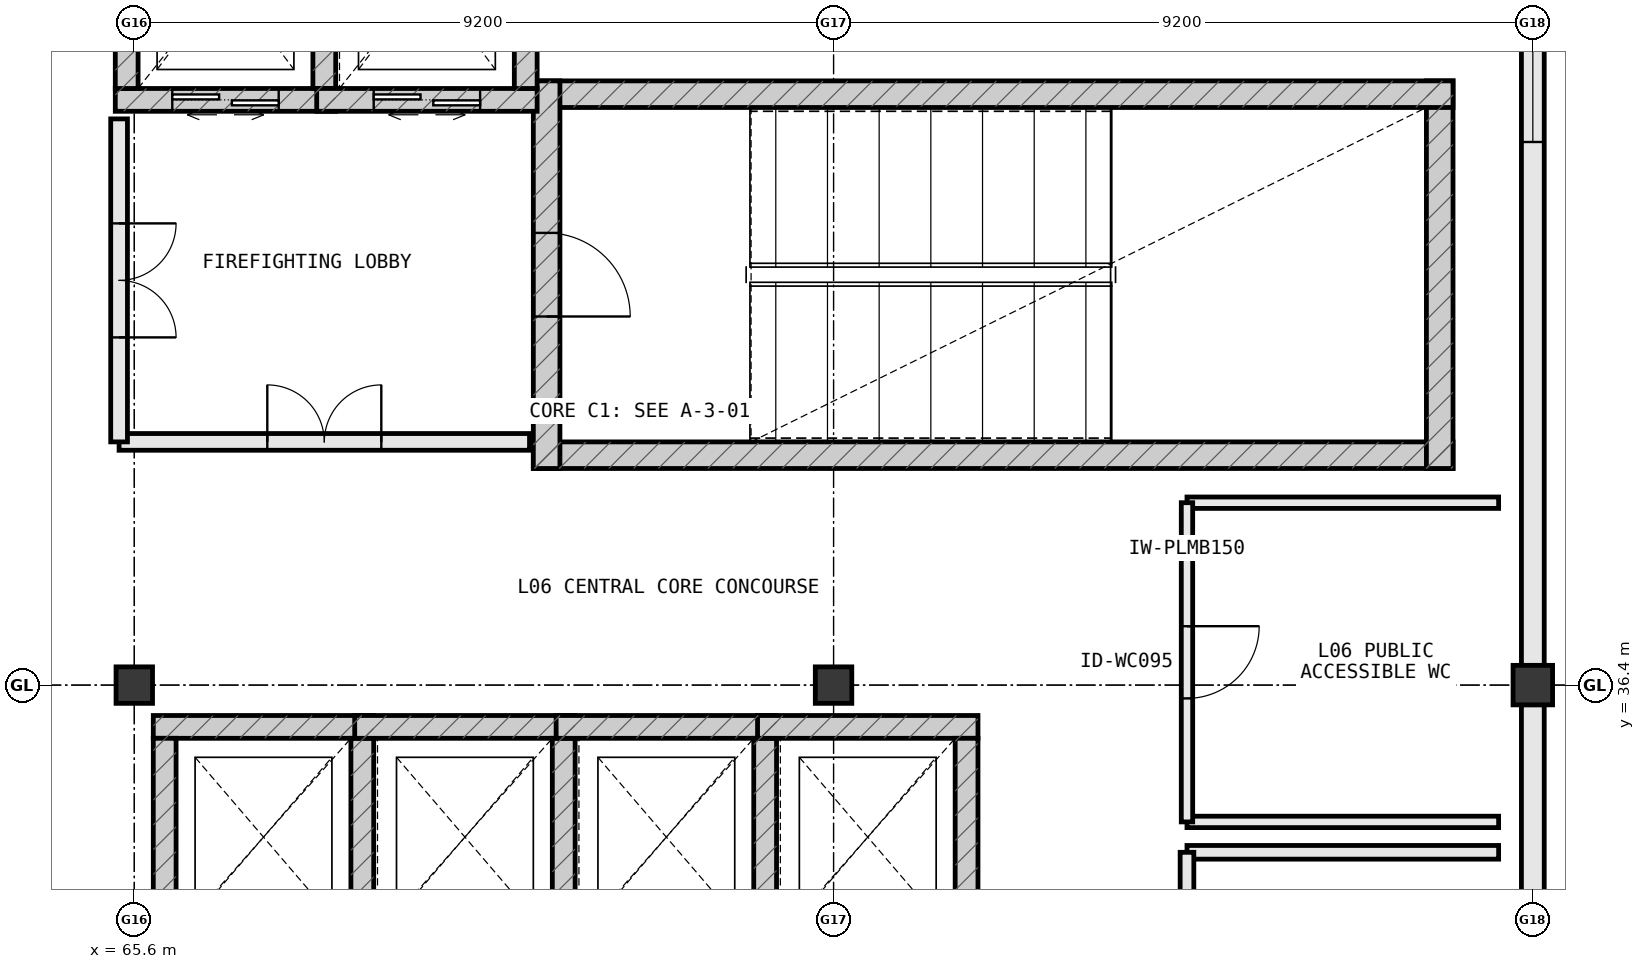
"""IFC4 building model, lengths in metres.
Left out: names, types, materials, properties, quantities, classifications, styles, units other than length and angle.
Written with IfcOpenShell. Run it as: python <this file> out.ifc"""

import sys

from ifc_helpers import new_model, si_unit, direction, frame, frame_2d, origin, origin_2d, place, context, subcontext, project, spatial, rectangle, extrude, element, fill, save


model = new_model("IFC4")
c1 = context("Model", 3, precision=1e-05, world=origin(), true_north=direction((0.0, 1.0)))
c2 = subcontext(c1, "Body", "Model", "MODEL_VIEW")
j1 = project(units=[si_unit("LENGTHUNIT", "METRE"), si_unit("PLANEANGLEUNIT", "RADIAN")], contexts=[c1])
p1 = place(None, origin())
s1 = spatial("IfcSite", under=j1, at=p1, CompositionType="ELEMENT")
p2 = place(p1, origin())
s2 = spatial("IfcBuilding", under=s1, at=p2, CompositionType="ELEMENT")
p3 = place(p2, frame((0.0, 0.0, 27.6)))
s3 = spatial("IfcBuildingStorey", under=s2, at=p3, CompositionType="ELEMENT", Elevation=27.6)
p4 = place(p3, frame((74.8, 36.4, 0.0), z_axis=(0.0, 0.0, 1.0), x_axis=(1.0, 0.0, 0.0)))
e1 = element("IfcColumn", 1, at=p4, inside=s3, PredefinedType="COLUMN", context=c2, shape_type="SweptSolid", body=[
    extrude(rectangle(XDim=0.48, YDim=0.48, at=origin_2d()), origin(), (0.0, 0.0, 1.0), 3.8),
])
p5 = place(p3, frame((84.0, 36.4, 0.0), z_axis=(0.0, 0.0, 1.0), x_axis=(1.0, 0.0, 0.0)))
e2 = element("IfcColumn", 2, at=p5, inside=s3, PredefinedType="COLUMN", context=c2, shape_type="SweptSolid", body=[
    extrude(rectangle(XDim=0.52, YDim=0.52, at=origin_2d()), origin(), (0.0, 0.0, 1.0), 3.8),
])
p6 = place(p3, frame((65.6, 36.4, 0.0), z_axis=(0.0, 0.0, 1.0), x_axis=(1.0, 0.0, 0.0)))
e3 = element("IfcColumn", 3, at=p6, inside=s3, PredefinedType="COLUMN", context=c2, shape_type="SweptSolid", body=[
    extrude(rectangle(XDim=0.48, YDim=0.48, at=origin_2d()), origin(), (0.0, 0.0, 1.0), 3.8),
])
p7 = place(p3, frame((84.0, 27.258, 0.0), z_axis=(0.0, 0.0, 1.0), x_axis=(0.0, 1.0, 0.0)))
e4 = element("IfcWall", 4, at=p7, inside=s3, PredefinedType="STANDARD", context=c2, shape_type="SweptSolid", body=[
    extrude(rectangle(XDim=8.884, YDim=0.3, at=frame_2d((4.442, 0.0))), origin(), (0.0, 0.0, 1.0), 2.97),
])
p8 = place(p7, frame((3.617, 0.0, 0.85)))
e5 = element("IfcOpeningElement", 5, at=p8, cuts=e4, PredefinedType="OPENING", context=c2, shape_type="SweptSolid", body=[
    extrude(rectangle(XDim=1.65, YDim=1.8, at=frame_2d((0.825, 0.9))), frame((0.0, 0.162, 0.0), z_axis=(0.0, -1.0, 0.0), x_axis=(1.0, 0.0, 0.0)), (0.0, 0.0, 1.0), 0.324),
])
p9 = place(p3, frame((84.0, 36.658, 0.0), z_axis=(0.0, 0.0, 1.0), x_axis=(0.0, 1.0, 0.0)))
e6 = element("IfcWall", 6, at=p9, inside=s3, PredefinedType="STANDARD", context=c2, shape_type="SweptSolid", body=[
    extrude(rectangle(XDim=10.284, YDim=0.3, at=frame_2d((5.142, 0.0))), origin(), (0.0, 0.0, 1.0), 2.97),
])
p10 = place(p9, frame((6.888, 0.0, 0.85)))
e7 = element("IfcOpeningElement", 7, at=p10, cuts=e6, PredefinedType="OPENING", context=c2, shape_type="SweptSolid", body=[
    extrude(rectangle(XDim=1.65, YDim=1.8, at=frame_2d((0.825, 0.9))), frame((0.0, 0.162, 0.0), z_axis=(0.0, -1.0, 0.0), x_axis=(1.0, 0.0, 0.0)), (0.0, 0.0, 1.0), 0.324),
])
p11 = place(p3, frame((70.85, 39.425, 0.0), z_axis=(0.0, 0.0, 1.0), x_axis=(1.0, 0.0, 0.0)))
e8 = element("IfcWall", 8, at=p11, inside=s3, PredefinedType="SHEAR", context=c2, shape_type="SweptSolid", body=[
    extrude(rectangle(XDim=12.1, YDim=0.35, at=frame_2d((6.05, 0.0))), origin(), (0.0, 0.0, 1.0), 3.8),
])
p12 = place(p3, frame((82.775, 39.25, 0.0), z_axis=(0.0, 0.0, 1.0), x_axis=(0.0, 1.0, 0.0)))
e9 = element("IfcWall", 9, at=p12, inside=s3, PredefinedType="SHEAR", context=c2, shape_type="SweptSolid", body=[
    extrude(rectangle(XDim=5.1, YDim=0.35, at=frame_2d((2.55, 0.0))), origin(), (0.0, 0.0, 1.0), 3.8),
])
p13 = place(p3, frame((82.95, 44.175, 0.0), z_axis=(0.0, 0.0, 1.0), x_axis=(-1.0, 0.0, 0.0)))
e10 = element("IfcWall", 10, at=p13, inside=s3, PredefinedType="SHEAR", context=c2, shape_type="SweptSolid", body=[
    extrude(rectangle(XDim=12.1, YDim=0.35, at=frame_2d((6.05, 0.0))), origin(), (0.0, 0.0, 1.0), 3.8),
])
p14 = place(p3, frame((71.025, 44.35, 0.0), z_axis=(0.0, 0.0, 1.0), x_axis=(0.0, -1.0, 0.0)))
e11 = element("IfcWall", 11, at=p14, inside=s3, PredefinedType="SHEAR", context=c2, shape_type="SweptSolid", body=[
    extrude(rectangle(XDim=5.1, YDim=0.35, at=frame_2d((2.55, 0.0))), origin(), (0.0, 0.0, 1.0), 3.8),
])
p15 = place(p14, frame((2.0, 0.0, 0.0)))
e12 = element("IfcOpeningElement", 12, at=p15, cuts=e11, PredefinedType="OPENING", context=c2, shape_type="SweptSolid", body=[
    extrude(rectangle(XDim=1.1, YDim=2.2, at=frame_2d((0.55, 1.1))), frame((0.0, 0.187, 0.0), z_axis=(0.0, -1.0, 0.0), x_axis=(1.0, 0.0, 0.0)), (0.0, 0.0, 1.0), 0.374),
])
p16 = place(p3, frame((65.35, 44.1, 0.0), z_axis=(0.0, 0.0, 1.0), x_axis=(1.0, 0.0, 0.0)))
e13 = element("IfcWall", 13, at=p16, inside=s3, PredefinedType="SHEAR", context=c2, shape_type="SweptSolid", body=[
    extrude(rectangle(XDim=2.9, YDim=0.3, at=frame_2d((1.45, 0.0))), origin(), (0.0, 0.0, 1.0), 3.8),
])
p17 = place(p16, frame((0.75, 0.0, 0.0)))
e14 = element("IfcOpeningElement", 14, at=p17, cuts=e13, PredefinedType="OPENING", context=c2, shape_type="SweptSolid", body=[
    extrude(rectangle(XDim=1.4, YDim=2.2, at=frame_2d((0.7, 1.1))), frame((0.0, 0.162, 0.0), z_axis=(0.0, -1.0, 0.0), x_axis=(1.0, 0.0, 0.0)), (0.0, 0.0, 1.0), 0.324),
])
for number, where, z_axis, x_axis in (
    (15, (68.1, 44.25, 0.0), (0.0, 0.0, 1.0), (0.0, 1.0, 0.0)),
    (16, (65.5, 47.15, 0.0), (0.0, 0.0, 1.0), (0.0, -1.0, 0.0)),
):
    element("IfcWall", number, at=place(p3, frame(where, z_axis=z_axis, x_axis=x_axis)), inside=s3, PredefinedType="SHEAR", context=c2, shape_type="SweptSolid", body=[
        extrude(rectangle(XDim=2.9, YDim=0.3, at=frame_2d((1.45, 0.0))), origin(), (0.0, 0.0, 1.0), 3.8),
    ])
p18 = place(p3, frame((68.0, 44.1, 0.0), z_axis=(0.0, 0.0, 1.0), x_axis=(1.0, 0.0, 0.0)))
e17 = element("IfcWall", 17, at=p18, inside=s3, PredefinedType="SHEAR", context=c2, shape_type="SweptSolid", body=[
    extrude(rectangle(XDim=2.9, YDim=0.3, at=frame_2d((1.45, 0.0))), origin(), (0.0, 0.0, 1.0), 3.8),
])
p19 = place(p18, frame((0.75, 0.0, 0.0)))
e18 = element("IfcOpeningElement", 18, at=p19, cuts=e17, PredefinedType="OPENING", context=c2, shape_type="SweptSolid", body=[
    extrude(rectangle(XDim=1.4, YDim=2.2, at=frame_2d((0.7, 1.1))), frame((0.0, 0.162, 0.0), z_axis=(0.0, -1.0, 0.0), x_axis=(1.0, 0.0, 0.0)), (0.0, 0.0, 1.0), 0.324),
])
for number, where, z_axis, x_axis in (
    (19, (70.75, 44.25, 0.0), (0.0, 0.0, 1.0), (0.0, 1.0, 0.0)),
    (20, (68.75, 35.85, 0.0), (0.0, 0.0, 1.0), (-1.0, 0.0, 0.0)),
):
    element("IfcWall", number, at=place(p3, frame(where, z_axis=z_axis, x_axis=x_axis)), inside=s3, PredefinedType="SHEAR", context=c2, shape_type="SweptSolid", body=[
        extrude(rectangle(XDim=2.9, YDim=0.3, at=frame_2d((1.45, 0.0))), origin(), (0.0, 0.0, 1.0), 3.8),
    ])
for number, where, z_axis, x_axis in (
    (21, (68.6, 33.1, 0.0), (0.0, 0.0, 1.0), (0.0, 1.0, 0.0)),
    (22, (66.0, 35.7, 0.0), (0.0, 0.0, 1.0), (0.0, -1.0, 0.0)),
):
    element("IfcWall", number, at=place(p3, frame(where, z_axis=z_axis, x_axis=x_axis)), inside=s3, PredefinedType="SHEAR", context=c2, shape_type="SweptSolid", body=[
        extrude(rectangle(XDim=2.6, YDim=0.3, at=frame_2d((1.3, 0.0))), origin(), (0.0, 0.0, 1.0), 3.8),
    ])
p20 = place(p3, frame((71.4, 35.85, 0.0), z_axis=(0.0, 0.0, 1.0), x_axis=(-1.0, 0.0, 0.0)))
e23 = element("IfcWall", 23, at=p20, inside=s3, PredefinedType="SHEAR", context=c2, shape_type="SweptSolid", body=[
    extrude(rectangle(XDim=2.9, YDim=0.3, at=frame_2d((1.45, 0.0))), origin(), (0.0, 0.0, 1.0), 3.8),
])
p21 = place(p3, frame((71.25, 33.1, 0.0), z_axis=(0.0, 0.0, 1.0), x_axis=(0.0, 1.0, 0.0)))
e24 = element("IfcWall", 24, at=p21, inside=s3, PredefinedType="SHEAR", context=c2, shape_type="SweptSolid", body=[
    extrude(rectangle(XDim=2.6, YDim=0.3, at=frame_2d((1.3, 0.0))), origin(), (0.0, 0.0, 1.0), 3.8),
])
p22 = place(p3, frame((74.05, 35.85, 0.0), z_axis=(0.0, 0.0, 1.0), x_axis=(-1.0, 0.0, 0.0)))
e25 = element("IfcWall", 25, at=p22, inside=s3, PredefinedType="SHEAR", context=c2, shape_type="SweptSolid", body=[
    extrude(rectangle(XDim=2.9, YDim=0.3, at=frame_2d((1.45, 0.0))), origin(), (0.0, 0.0, 1.0), 3.8),
])
p23 = place(p3, frame((73.9, 33.1, 0.0), z_axis=(0.0, 0.0, 1.0), x_axis=(0.0, 1.0, 0.0)))
e26 = element("IfcWall", 26, at=p23, inside=s3, PredefinedType="SHEAR", context=c2, shape_type="SweptSolid", body=[
    extrude(rectangle(XDim=2.6, YDim=0.3, at=frame_2d((1.3, 0.0))), origin(), (0.0, 0.0, 1.0), 3.8),
])
p24 = place(p3, frame((76.7, 35.85, 0.0), z_axis=(0.0, 0.0, 1.0), x_axis=(-1.0, 0.0, 0.0)))
e27 = element("IfcWall", 27, at=p24, inside=s3, PredefinedType="SHEAR", context=c2, shape_type="SweptSolid", body=[
    extrude(rectangle(XDim=2.9, YDim=0.3, at=frame_2d((1.45, 0.0))), origin(), (0.0, 0.0, 1.0), 3.8),
])
p25 = place(p3, frame((76.55, 33.1, 0.0), z_axis=(0.0, 0.0, 1.0), x_axis=(0.0, 1.0, 0.0)))
e28 = element("IfcWall", 28, at=p25, inside=s3, PredefinedType="SHEAR", context=c2, shape_type="SweptSolid", body=[
    extrude(rectangle(XDim=2.6, YDim=0.3, at=frame_2d((1.3, 0.0))), origin(), (0.0, 0.0, 1.0), 3.8),
])
p26 = place(p3, frame((65.4, 39.6, 0.0), z_axis=(0.0, 0.0, 1.0), x_axis=(1.0, 0.0, 0.0)))
e29 = element("IfcWall", 29, at=p26, inside=s3, PredefinedType="STANDARD", context=c2, shape_type="SweptSolid", body=[
    extrude(rectangle(XDim=5.4, YDim=0.22, at=frame_2d((2.7, 0.0))), origin(), (0.0, 0.0, 1.0), 3.555),
])
p27 = place(p26, frame((1.95, 0.0, 0.0)))
e30 = element("IfcOpeningElement", 30, at=p27, cuts=e29, PredefinedType="OPENING", context=c2, shape_type="SweptSolid", body=[
    extrude(rectangle(XDim=1.5, YDim=2.2, at=frame_2d((0.75, 1.1))), frame((0.0, 0.122, 0.0), z_axis=(0.0, -1.0, 0.0), x_axis=(1.0, 0.0, 0.0)), (0.0, 0.0, 1.0), 0.244),
])
p28 = place(p3, frame((65.4, 43.85, 0.0), z_axis=(0.0, 0.0, 1.0), x_axis=(0.0, -1.0, 0.0)))
e31 = element("IfcWall", 31, at=p28, inside=s3, PredefinedType="STANDARD", context=c2, shape_type="SweptSolid", body=[
    extrude(rectangle(XDim=4.25, YDim=0.22, at=frame_2d((2.125, 0.0))), origin(), (0.0, 0.0, 1.0), 3.555),
])
p29 = place(p28, frame((1.375, 0.0, 0.0)))
e32 = element("IfcOpeningElement", 32, at=p29, cuts=e31, PredefinedType="OPENING", context=c2, shape_type="SweptSolid", body=[
    extrude(rectangle(XDim=1.5, YDim=2.2, at=frame_2d((0.75, 1.1))), frame((0.0, 0.122, 0.0), z_axis=(0.0, -1.0, 0.0), x_axis=(1.0, 0.0, 0.0)), (0.0, 0.0, 1.0), 0.244),
])
p30 = place(p3, frame((83.55, 34.2, 0.0), z_axis=(0.0, 0.0, 1.0), x_axis=(-1.0, 0.0, 0.0)))
e33 = element("IfcWall", 33, at=p30, inside=s3, PredefinedType="PARTITIONING", context=c2, shape_type="SweptSolid", body=[
    extrude(rectangle(XDim=4.1, YDim=0.18, at=frame_2d((2.05, 0.0))), origin(), (0.0, 0.0, 1.0), 3.555),
])
p31 = place(p3, frame((79.45, 34.2, 0.0), z_axis=(0.0, 0.0, 1.0), x_axis=(0.0, -1.0, 0.0)))
e34 = element("IfcWall", 34, at=p31, inside=s3, PredefinedType="PARTITIONING", context=c2, shape_type="SweptSolid", body=[
    extrude(rectangle(XDim=4.4, YDim=0.18, at=frame_2d((2.2, 0.0))), origin(), (0.0, 0.0, 1.0), 3.555),
])
p32 = place(p31, frame((1.675, 0.0, 0.0)))
e35 = element("IfcOpeningElement", 35, at=p32, cuts=e34, PredefinedType="OPENING", context=c2, shape_type="SweptSolid", body=[
    extrude(rectangle(XDim=1.05, YDim=2.2, at=frame_2d((0.525, 1.1))), frame((0.0, 0.102, 0.0), z_axis=(0.0, -1.0, 0.0), x_axis=(1.0, 0.0, 0.0)), (0.0, 0.0, 1.0), 0.204),
])
for number, where, z_axis, x_axis in (
    (36, (79.45, 34.6, 0.0), (0.0, 0.0, 1.0), (1.0, 0.0, 0.0)),
    (37, (83.55, 38.8, 0.0), (0.0, 0.0, 1.0), (-1.0, 0.0, 0.0)),
):
    element("IfcWall", number, at=place(p3, frame(where, z_axis=z_axis, x_axis=x_axis)), inside=s3, PredefinedType="PLUMBINGWALL", context=c2, shape_type="SweptSolid", body=[
        extrude(rectangle(XDim=4.1, YDim=0.15, at=frame_2d((2.05, 0.0))), origin(), (0.0, 0.0, 1.0), 3.555),
    ])
p33 = place(p3, frame((79.45, 38.8, 0.0), z_axis=(0.0, 0.0, 1.0), x_axis=(0.0, -1.0, 0.0)))
e38 = element("IfcWall", 38, at=p33, inside=s3, PredefinedType="PLUMBINGWALL", context=c2, shape_type="SweptSolid", body=[
    extrude(rectangle(XDim=4.2, YDim=0.15, at=frame_2d((2.1, 0.0))), origin(), (0.0, 0.0, 1.0), 3.555),
])
p34 = place(p33, frame((1.625, 0.0, 0.0)))
e39 = element("IfcOpeningElement", 39, at=p34, cuts=e38, PredefinedType="OPENING", context=c2, shape_type="SweptSolid", body=[
    extrude(rectangle(XDim=0.95, YDim=2.15, at=frame_2d((0.475, 1.075))), frame((0.0, 0.087, 0.0), z_axis=(0.0, -1.0, 0.0), x_axis=(1.0, 0.0, 0.0)), (0.0, 0.0, 1.0), 0.174),
])
p35 = place(p10, origin())
e40 = element("IfcWindow", 40, at=p35, inside=s3, PartitioningType="SINGLE_PANEL", PredefinedType="WINDOW", context=c2, shape_type="SweptSolid", body=[
    extrude(rectangle(XDim=1.65, YDim=1.8, at=frame_2d((0.825, 0.9))), frame((0.0, 0.03, 0.0), z_axis=(0.0, -1.0, 0.0), x_axis=(1.0, 0.0, 0.0)), (0.0, 0.0, 1.0), 0.06),
])
fill(e7, e40)
p36 = place(p15, origin())
e41 = element("IfcDoor", 41, at=p36, inside=s3, OperationType="SINGLE_SWING_RIGHT", PredefinedType="DOOR", context=c2, shape_type="SweptSolid", body=[
    extrude(rectangle(XDim=1.1, YDim=2.2, at=frame_2d((0.55, 1.1))), frame((0.0, 0.025, 0.0), z_axis=(0.0, -1.0, 0.0), x_axis=(1.0, 0.0, 0.0)), (0.0, 0.0, 1.0), 0.05),
])
fill(e12, e41)
p37 = place(p17, origin())
e42 = element("IfcDoor", 42, at=p37, inside=s3, OperationType="DOUBLE_DOOR_SLIDING", PredefinedType="DOOR", context=c2, shape_type="SweptSolid", body=[
    extrude(rectangle(XDim=1.4, YDim=2.2, at=frame_2d((0.7, 1.1))), frame((0.0, 0.025, 0.0), z_axis=(0.0, -1.0, 0.0), x_axis=(1.0, 0.0, 0.0)), (0.0, 0.0, 1.0), 0.05),
])
fill(e14, e42)
p38 = place(p19, origin())
e43 = element("IfcDoor", 43, at=p38, inside=s3, OperationType="DOUBLE_DOOR_SLIDING", PredefinedType="DOOR", context=c2, shape_type="SweptSolid", body=[
    extrude(rectangle(XDim=1.4, YDim=2.2, at=frame_2d((0.7, 1.1))), frame((0.0, 0.025, 0.0), z_axis=(0.0, -1.0, 0.0), x_axis=(1.0, 0.0, 0.0)), (0.0, 0.0, 1.0), 0.05),
])
fill(e18, e43)
p39 = place(p27, origin())
e44 = element("IfcDoor", 44, at=p39, inside=s3, OperationType="DOUBLE_DOOR_SINGLE_SWING", PredefinedType="DOOR", context=c2, shape_type="SweptSolid", body=[
    extrude(rectangle(XDim=1.5, YDim=2.2, at=frame_2d((0.75, 1.1))), frame((0.0, 0.025, 0.0), z_axis=(0.0, -1.0, 0.0), x_axis=(1.0, 0.0, 0.0)), (0.0, 0.0, 1.0), 0.05),
])
fill(e30, e44)
p40 = place(p29, origin())
e45 = element("IfcDoor", 45, at=p40, inside=s3, OperationType="DOUBLE_DOOR_SINGLE_SWING", PredefinedType="DOOR", context=c2, shape_type="SweptSolid", body=[
    extrude(rectangle(XDim=1.5, YDim=2.2, at=frame_2d((0.75, 1.1))), frame((0.0, 0.025, 0.0), z_axis=(0.0, -1.0, 0.0), x_axis=(1.0, 0.0, 0.0)), (0.0, 0.0, 1.0), 0.05),
])
fill(e32, e45)
p41 = place(p34, origin())
e46 = element("IfcDoor", 46, at=p41, inside=s3, OperationType="SINGLE_SWING_LEFT", PredefinedType="DOOR", context=c2, shape_type="SweptSolid", body=[
    extrude(rectangle(XDim=0.95, YDim=2.15, at=frame_2d((0.475, 1.075))), frame((0.0, 0.025, 0.0), z_axis=(0.0, -1.0, 0.0), x_axis=(1.0, 0.0, 0.0)), (0.0, 0.0, 1.0), 0.05),
])
fill(e39, e46)
save(model, sys.argv[1])
